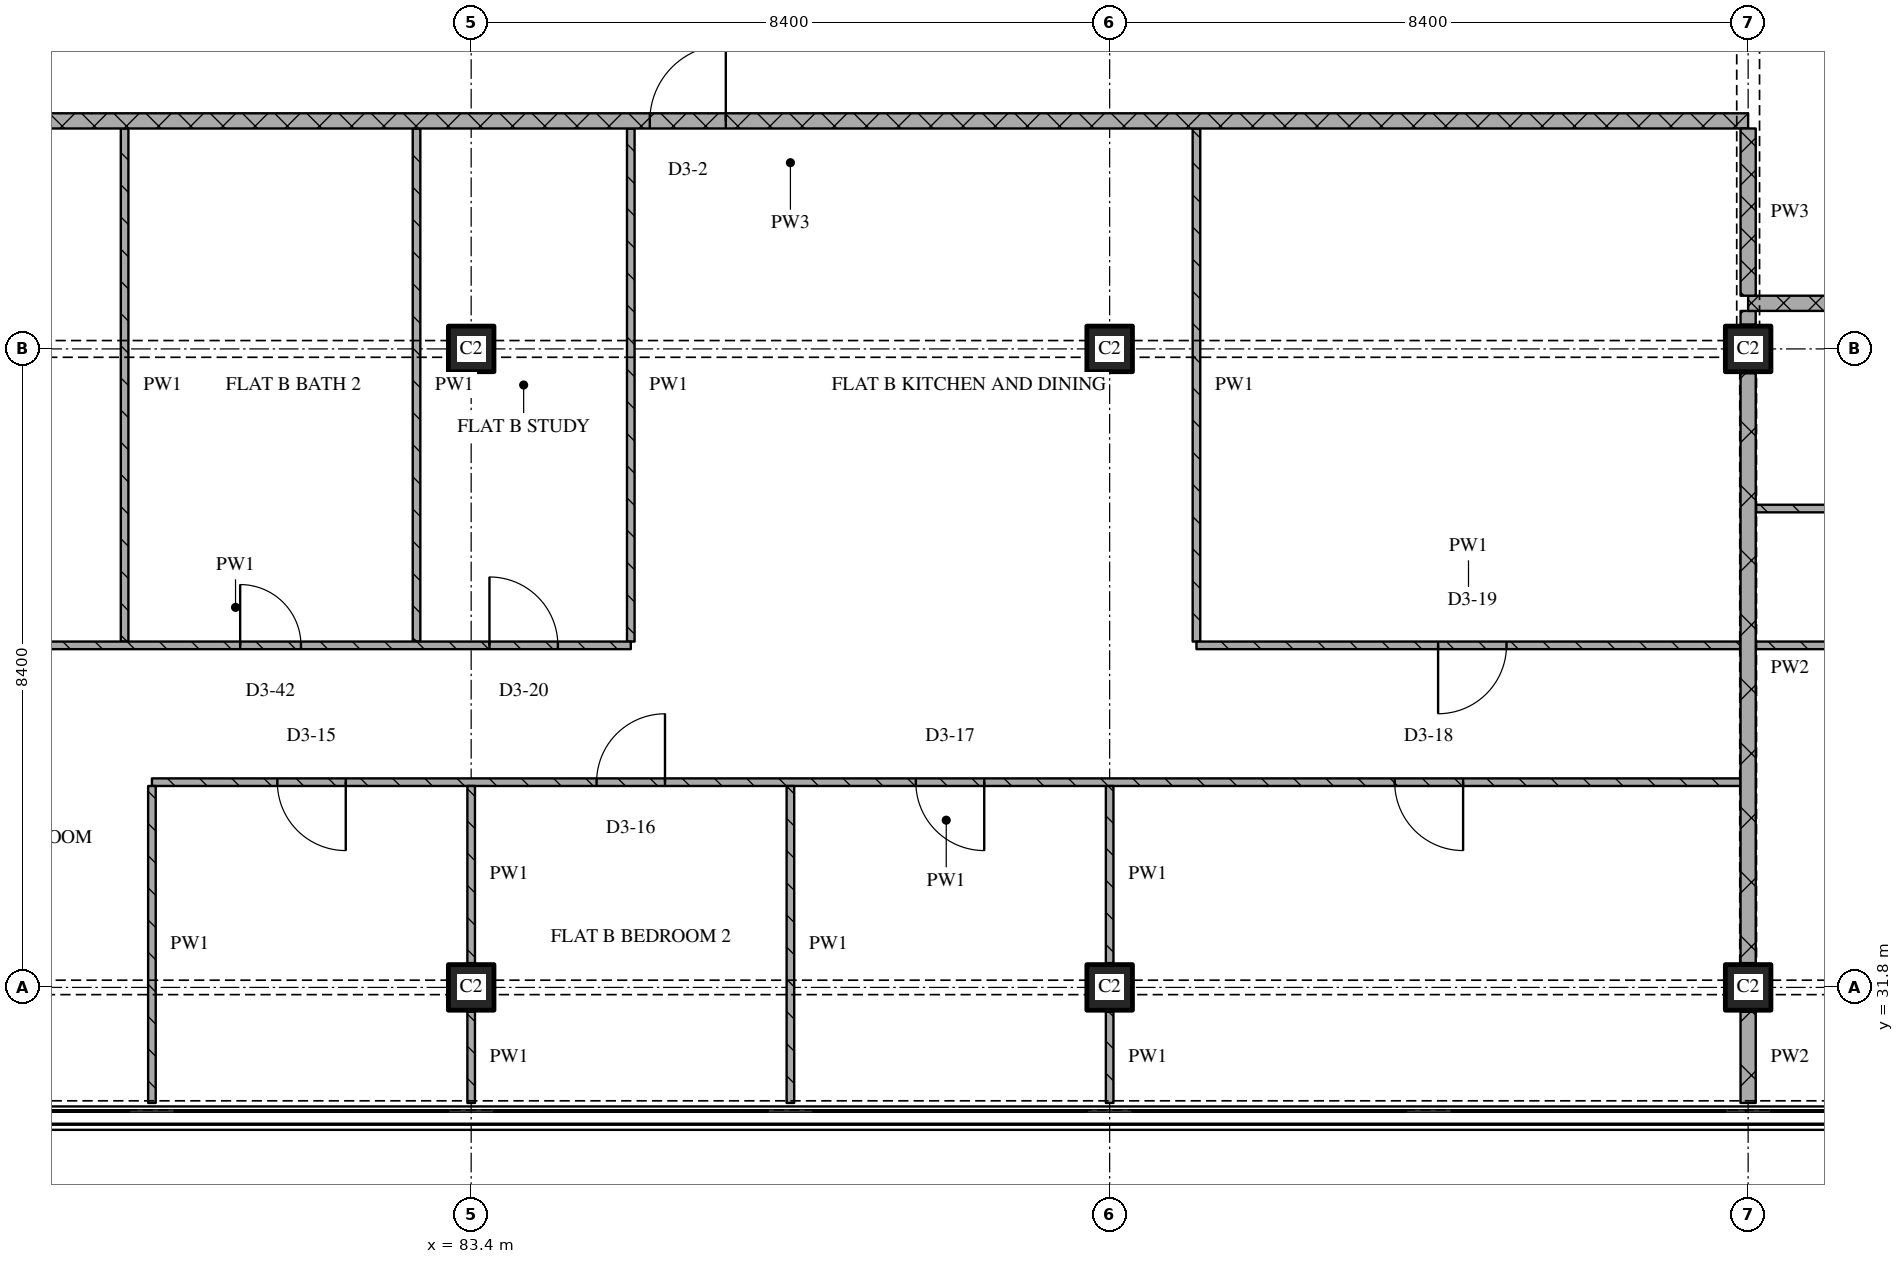
"""IFC4 building model, lengths in metres.
Left out: names, types, materials, properties, quantities, classifications, styles, units other than length and angle.
Written with IfcOpenShell. Run it as: python <this file> out.ifc"""

import sys

from ifc_helpers import new_model, si_unit, direction, frame, frame_2d, origin, origin_2d, place, context, subcontext, project, spatial, rectangle, extrude, element, fill, save


model = new_model("IFC4")
c1 = context("Model", 3, precision=1e-05, world=origin(), true_north=direction((0.0, 1.0)))
c2 = subcontext(c1, "Body", "Model", "MODEL_VIEW")
j1 = project(units=[si_unit("LENGTHUNIT", "METRE"), si_unit("PLANEANGLEUNIT", "RADIAN")], contexts=[c1])
p1 = place(None, origin())
s1 = spatial("IfcSite", under=j1, at=p1, CompositionType="ELEMENT")
p2 = place(p1, origin())
s2 = spatial("IfcBuilding", under=s1, at=p2, CompositionType="ELEMENT")
p3 = place(p2, frame((0.0, 0.0, 227.1)))
s3 = spatial("IfcBuildingStorey", under=s2, at=p3, CompositionType="ELEMENT", Elevation=227.1)
for number, where, z_axis, x_axis in (
    (1, (83.4, 31.8, 0.0), (0.0, 0.0, 1.0), (1.0, 0.0, 0.0)),
    (2, (83.4, 40.2, 0.0), (0.0, 0.0, 1.0), (1.0, 0.0, 0.0)),
    (3, (91.8, 31.8, 0.0), (0.0, 0.0, 1.0), (1.0, 0.0, 0.0)),
    (4, (91.8, 40.2, 0.0), (0.0, 0.0, 1.0), (1.0, 0.0, 0.0)),
    (5, (100.2, 31.8, 0.0), (0.0, 0.0, 1.0), (1.0, 0.0, 0.0)),
    (6, (100.2, 40.2, 0.0), (0.0, 0.0, 1.0), (1.0, 0.0, 0.0)),
):
    element("IfcColumn", number, at=place(p3, frame(where, z_axis=z_axis, x_axis=x_axis)), inside=s3, PredefinedType="COLUMN", context=c2, shape_type="SweptSolid", body=[
        extrude(rectangle(XDim=0.6, YDim=0.6, at=origin_2d()), origin(), (0.0, 0.0, 1.0), 3.6),
    ])
p4 = place(p3, frame((100.1, 34.5, 0.0), z_axis=(0.0, 0.0, 1.0), x_axis=(-1.0, 0.0, 0.0)))
e7 = element("IfcWall", 7, at=p4, inside=s3, PredefinedType="PARTITIONING", context=c2, shape_type="SweptSolid", body=[
    extrude(rectangle(XDim=20.9, YDim=0.1, at=frame_2d((10.45, 0.0))), origin(), (0.0, 0.0, 1.0), 3.32),
])
p5 = place(p4, frame((3.65, 0.0, 0.0)))
e8 = element("IfcOpeningElement", 8, at=p5, cuts=e7, PredefinedType="OPENING", context=c2, shape_type="SweptSolid", body=[
    extrude(rectangle(XDim=0.9, YDim=2.1, at=frame_2d((0.45, 1.05))), frame((0.0, 0.06, 0.0), z_axis=(0.0, -1.0, 0.0), x_axis=(1.0, 0.0, 0.0)), (0.0, 0.0, 1.0), 0.12),
])
p6 = place(p4, frame((9.95, 0.0, 0.0)))
e9 = element("IfcOpeningElement", 9, at=p6, cuts=e7, PredefinedType="OPENING", context=c2, shape_type="SweptSolid", body=[
    extrude(rectangle(XDim=0.9, YDim=2.1, at=frame_2d((0.45, 1.05))), frame((0.0, 0.06, 0.0), z_axis=(0.0, -1.0, 0.0), x_axis=(1.0, 0.0, 0.0)), (0.0, 0.0, 1.0), 0.12),
])
p7 = place(p4, frame((14.15, 0.0, 0.0)))
e10 = element("IfcOpeningElement", 10, at=p7, cuts=e7, PredefinedType="OPENING", context=c2, shape_type="SweptSolid", body=[
    extrude(rectangle(XDim=0.9, YDim=2.1, at=frame_2d((0.45, 1.05))), frame((0.0, 0.06, 0.0), z_axis=(0.0, -1.0, 0.0), x_axis=(1.0, 0.0, 0.0)), (0.0, 0.0, 1.0), 0.12),
])
p8 = place(p4, frame((18.35, 0.0, 0.0)))
e11 = element("IfcOpeningElement", 11, at=p8, cuts=e7, PredefinedType="OPENING", context=c2, shape_type="SweptSolid", body=[
    extrude(rectangle(XDim=0.9, YDim=2.1, at=frame_2d((0.45, 1.05))), frame((0.0, 0.06, 0.0), z_axis=(0.0, -1.0, 0.0), x_axis=(1.0, 0.0, 0.0)), (0.0, 0.0, 1.0), 0.12),
])
p9 = place(p3, frame((100.3, 38.1, 0.0), z_axis=(0.0, 0.0, 1.0), x_axis=(1.0, 0.0, 0.0)))
e12 = element("IfcWall", 12, at=p9, inside=s3, PredefinedType="PARTITIONING", context=c2, shape_type="SweptSolid", body=[
    extrude(rectangle(XDim=9.5, YDim=0.1, at=frame_2d((4.75, 0.0))), origin(), (0.0, 0.0, 1.0), 3.32),
])
p10 = place(p9, frame((1.75, 0.0, 0.0)))
e13 = element("IfcOpeningElement", 13, at=p10, cuts=e12, PredefinedType="OPENING", context=c2, shape_type="SweptSolid", body=[
    extrude(rectangle(XDim=0.8, YDim=2.1, at=frame_2d((0.4, 1.05))), frame((0.0, 0.06, 0.0), z_axis=(0.0, -1.0, 0.0), x_axis=(1.0, 0.0, 0.0)), (0.0, 0.0, 1.0), 0.12),
])
p11 = place(p3, frame((124.58, 40.8, 0.0), z_axis=(0.0, 0.0, 1.0), x_axis=(-1.0, 0.0, 0.0)))
e14 = element("IfcWall", 14, at=p11, inside=s3, PredefinedType="PARTITIONING", context=c2, shape_type="SweptSolid", body=[
    extrude(rectangle(XDim=24.38, YDim=0.2, at=frame_2d((12.19, 0.0))), origin(), (0.0, 0.0, 1.0), 3.32),
])
p12 = place(p11, frame((13.53, 0.0, 0.0)))
e15 = element("IfcOpeningElement", 15, at=p12, cuts=e14, PredefinedType="OPENING", context=c2, shape_type="SweptSolid", body=[
    extrude(rectangle(XDim=1.0, YDim=2.1, at=frame_2d((0.5, 1.05))), frame((0.0, 0.11, 0.0), z_axis=(0.0, -1.0, 0.0), x_axis=(1.0, 0.0, 0.0)), (0.0, 0.0, 1.0), 0.22),
])
p13 = place(p3, frame((100.2, 43.2, 0.0), z_axis=(0.0, 0.0, 1.0), x_axis=(-1.0, 0.0, 0.0)))
e16 = element("IfcWall", 16, at=p13, inside=s3, PredefinedType="PARTITIONING", context=c2, shape_type="SweptSolid", body=[
    extrude(rectangle(XDim=25.2, YDim=0.2, at=frame_2d((12.6, 0.0))), origin(), (0.0, 0.0, 1.0), 3.32),
])
p14 = place(p13, frame((13.45, 0.0, 0.0)))
e17 = element("IfcOpeningElement", 17, at=p14, cuts=e16, PredefinedType="OPENING", context=c2, shape_type="SweptSolid", body=[
    extrude(rectangle(XDim=1.0, YDim=2.1, at=frame_2d((0.5, 1.05))), frame((0.0, 0.11, 0.0), z_axis=(0.0, -1.0, 0.0), x_axis=(1.0, 0.0, 0.0)), (0.0, 0.0, 1.0), 0.22),
])
p15 = place(p3, frame((78.841, 43.1, 0.0), z_axis=(0.0, 0.0, 1.0), x_axis=(0.0, -1.0, 0.0)))
e18 = element("IfcWall", 18, at=p15, inside=s3, PredefinedType="PARTITIONING", context=c2, shape_type="SweptSolid", body=[
    extrude(rectangle(XDim=6.75, YDim=0.1, at=frame_2d((3.375, 0.0))), origin(), (0.0, 0.0, 1.0), 3.32),
])
p16 = place(p3, frame((79.2, 34.45, 0.0), z_axis=(0.0, 0.0, 1.0), x_axis=(0.0, -1.0, 0.0)))
e19 = element("IfcWall", 19, at=p16, inside=s3, PredefinedType="PARTITIONING", context=c2, shape_type="SweptSolid", body=[
    extrude(rectangle(XDim=4.17, YDim=0.1, at=frame_2d((2.085, 0.0))), origin(), (0.0, 0.0, 1.0), 3.32),
])
p17 = place(p3, frame((82.681, 43.1, 0.0), z_axis=(0.0, 0.0, 1.0), x_axis=(0.0, -1.0, 0.0)))
e20 = element("IfcWall", 20, at=p17, inside=s3, PredefinedType="PARTITIONING", context=c2, shape_type="SweptSolid", body=[
    extrude(rectangle(XDim=6.75, YDim=0.1, at=frame_2d((3.375, 0.0))), origin(), (0.0, 0.0, 1.0), 3.32),
])
p18 = place(p3, frame((83.4, 31.48, 0.0), z_axis=(0.0, 0.0, 1.0), x_axis=(0.0, -1.0, 0.0)))
e21 = element("IfcWall", 21, at=p18, inside=s3, PredefinedType="PARTITIONING", context=c2, shape_type="SweptSolid", body=[
    extrude(rectangle(XDim=1.2, YDim=0.1, at=frame_2d((0.6, 0.0))), origin(), (0.0, 0.0, 1.0), 3.32),
])
p19 = place(p3, frame((83.4, 34.45, 0.0), z_axis=(0.0, 0.0, 1.0), x_axis=(0.0, -1.0, 0.0)))
e22 = element("IfcWall", 22, at=p19, inside=s3, PredefinedType="PARTITIONING", context=c2, shape_type="SweptSolid", body=[
    extrude(rectangle(XDim=2.33, YDim=0.1, at=frame_2d((1.165, 0.0))), origin(), (0.0, 0.0, 1.0), 3.32),
])
p20 = place(p3, frame((85.5, 43.1, 0.0), z_axis=(0.0, 0.0, 1.0), x_axis=(0.0, -1.0, 0.0)))
e23 = element("IfcWall", 23, at=p20, inside=s3, PredefinedType="PARTITIONING", context=c2, shape_type="SweptSolid", body=[
    extrude(rectangle(XDim=6.75, YDim=0.1, at=frame_2d((3.375, 0.0))), origin(), (0.0, 0.0, 1.0), 3.32),
])
p21 = place(p3, frame((87.6, 34.45, 0.0), z_axis=(0.0, 0.0, 1.0), x_axis=(0.0, -1.0, 0.0)))
e24 = element("IfcWall", 24, at=p21, inside=s3, PredefinedType="PARTITIONING", context=c2, shape_type="SweptSolid", body=[
    extrude(rectangle(XDim=4.17, YDim=0.1, at=frame_2d((2.085, 0.0))), origin(), (0.0, 0.0, 1.0), 3.32),
])
p22 = place(p3, frame((91.8, 31.48, 0.0), z_axis=(0.0, 0.0, 1.0), x_axis=(0.0, -1.0, 0.0)))
e25 = element("IfcWall", 25, at=p22, inside=s3, PredefinedType="PARTITIONING", context=c2, shape_type="SweptSolid", body=[
    extrude(rectangle(XDim=1.2, YDim=0.1, at=frame_2d((0.6, 0.0))), origin(), (0.0, 0.0, 1.0), 3.32),
])
p23 = place(p3, frame((91.8, 34.45, 0.0), z_axis=(0.0, 0.0, 1.0), x_axis=(0.0, -1.0, 0.0)))
e26 = element("IfcWall", 26, at=p23, inside=s3, PredefinedType="PARTITIONING", context=c2, shape_type="SweptSolid", body=[
    extrude(rectangle(XDim=2.33, YDim=0.1, at=frame_2d((1.165, 0.0))), origin(), (0.0, 0.0, 1.0), 3.32),
])
p24 = place(p3, frame((92.942, 43.1, 0.0), z_axis=(0.0, 0.0, 1.0), x_axis=(0.0, -1.0, 0.0)))
e27 = element("IfcWall", 27, at=p24, inside=s3, PredefinedType="PARTITIONING", context=c2, shape_type="SweptSolid", body=[
    extrude(rectangle(XDim=6.75, YDim=0.1, at=frame_2d((3.375, 0.0))), origin(), (0.0, 0.0, 1.0), 3.32),
])
p25 = place(p3, frame((100.2, 43.1, 0.0), z_axis=(0.0, 0.0, 1.0), x_axis=(0.0, -1.0, 0.0)))
e28 = element("IfcWall", 28, at=p25, inside=s3, PredefinedType="PARTITIONING", context=c2, shape_type="SweptSolid", body=[
    extrude(rectangle(XDim=2.2, YDim=0.2, at=frame_2d((1.1, 0.0))), origin(), (0.0, 0.0, 1.0), 2.53),
])
p26 = place(p3, frame((100.2, 31.48, 0.0), z_axis=(0.0, 0.0, 1.0), x_axis=(0.0, -1.0, 0.0)))
e29 = element("IfcWall", 29, at=p26, inside=s3, PredefinedType="PARTITIONING", context=c2, shape_type="SweptSolid", body=[
    extrude(rectangle(XDim=1.2, YDim=0.2, at=frame_2d((0.6, 0.0))), origin(), (0.0, 0.0, 1.0), 3.32),
])
p27 = place(p3, frame((100.2, 39.88, 0.0), z_axis=(0.0, 0.0, 1.0), x_axis=(0.0, -1.0, 0.0)))
e30 = element("IfcWall", 30, at=p27, inside=s3, PredefinedType="PARTITIONING", context=c2, shape_type="SweptSolid", body=[
    extrude(rectangle(XDim=7.76, YDim=0.2, at=frame_2d((3.88, 0.0))), origin(), (0.0, 0.0, 1.0), 2.72),
])
p28 = place(p3, frame((100.2, 40.7, 0.0), z_axis=(0.0, 0.0, 1.0), x_axis=(0.0, -1.0, 0.0)))
e31 = element("IfcWall", 31, at=p28, inside=s3, PredefinedType="PARTITIONING", context=c2, shape_type="SweptSolid", body=[
    extrude(rectangle(XDim=0.18, YDim=0.2, at=frame_2d((0.09, 0.0))), origin(), (0.0, 0.0, 1.0), 3.32),
])
p29 = place(p3, frame((75.1, 36.3, 0.0), z_axis=(0.0, 0.0, 1.0), x_axis=(1.0, 0.0, 0.0)))
e32 = element("IfcWall", 32, at=p29, inside=s3, PredefinedType="PARTITIONING", context=c2, shape_type="SweptSolid", body=[
    extrude(rectangle(XDim=10.4, YDim=0.1, at=frame_2d((5.2, 0.0))), origin(), (0.0, 0.0, 1.0), 3.32),
])
p30 = place(p29, frame((1.42, 0.0, 0.0)))
e33 = element("IfcOpeningElement", 33, at=p30, cuts=e32, PredefinedType="OPENING", context=c2, shape_type="SweptSolid", body=[
    extrude(rectangle(XDim=0.8, YDim=2.1, at=frame_2d((0.4, 1.05))), frame((0.0, 0.06, 0.0), z_axis=(0.0, -1.0, 0.0), x_axis=(1.0, 0.0, 0.0)), (0.0, 0.0, 1.0), 0.12),
])
p31 = place(p29, frame((5.261, 0.0, 0.0)))
e34 = element("IfcOpeningElement", 34, at=p31, cuts=e32, PredefinedType="OPENING", context=c2, shape_type="SweptSolid", body=[
    extrude(rectangle(XDim=0.8, YDim=2.1, at=frame_2d((0.4, 1.05))), frame((0.0, 0.06, 0.0), z_axis=(0.0, -1.0, 0.0), x_axis=(1.0, 0.0, 0.0)), (0.0, 0.0, 1.0), 0.12),
])
p32 = place(p29, frame((8.541, 0.0, 0.0)))
e35 = element("IfcOpeningElement", 35, at=p32, cuts=e32, PredefinedType="OPENING", context=c2, shape_type="SweptSolid", body=[
    extrude(rectangle(XDim=0.9, YDim=2.1, at=frame_2d((0.45, 1.05))), frame((0.0, 0.06, 0.0), z_axis=(0.0, -1.0, 0.0), x_axis=(1.0, 0.0, 0.0)), (0.0, 0.0, 1.0), 0.12),
])
p33 = place(p3, frame((92.942, 36.3, 0.0), z_axis=(0.0, 0.0, 1.0), x_axis=(1.0, 0.0, 0.0)))
e36 = element("IfcWall", 36, at=p33, inside=s3, PredefinedType="PARTITIONING", context=c2, shape_type="SweptSolid", body=[
    extrude(rectangle(XDim=7.158, YDim=0.1, at=frame_2d((3.579, 0.0))), origin(), (0.0, 0.0, 1.0), 3.32),
])
p34 = place(p33, frame((3.179, 0.0, 0.0)))
e37 = element("IfcOpeningElement", 37, at=p34, cuts=e36, PredefinedType="OPENING", context=c2, shape_type="SweptSolid", body=[
    extrude(rectangle(XDim=0.9, YDim=2.1, at=frame_2d((0.45, 1.05))), frame((0.0, 0.06, 0.0), z_axis=(0.0, -1.0, 0.0), x_axis=(1.0, 0.0, 0.0)), (0.0, 0.0, 1.0), 0.12),
])
p35 = place(p3, frame((100.3, 36.3, 0.0), z_axis=(0.0, 0.0, 1.0), x_axis=(1.0, 0.0, 0.0)))
e38 = element("IfcWall", 38, at=p35, inside=s3, PredefinedType="PARTITIONING", context=c2, shape_type="SweptSolid", body=[
    extrude(rectangle(XDim=8.3, YDim=0.1, at=frame_2d((4.15, 0.0))), origin(), (0.0, 0.0, 1.0), 3.32),
])
p36 = place(p5, origin())
e39 = element("IfcDoor", 39, at=p36, inside=s3, OperationType="SINGLE_SWING_LEFT", PredefinedType="DOOR", context=c2, shape_type="SweptSolid", body=[
    extrude(rectangle(XDim=0.9, YDim=2.1, at=frame_2d((0.45, 1.05))), frame((0.0, 0.025, 0.0), z_axis=(0.0, -1.0, 0.0), x_axis=(1.0, 0.0, 0.0)), (0.0, 0.0, 1.0), 0.05),
])
fill(e8, e39)
p37 = place(p6, origin())
e40 = element("IfcDoor", 40, at=p37, inside=s3, OperationType="SINGLE_SWING_LEFT", PredefinedType="DOOR", context=c2, shape_type="SweptSolid", body=[
    extrude(rectangle(XDim=0.9, YDim=2.1, at=frame_2d((0.45, 1.05))), frame((0.0, 0.025, 0.0), z_axis=(0.0, -1.0, 0.0), x_axis=(1.0, 0.0, 0.0)), (0.0, 0.0, 1.0), 0.05),
])
fill(e9, e40)
p38 = place(p7, origin())
e41 = element("IfcDoor", 41, at=p38, inside=s3, OperationType="SINGLE_SWING_RIGHT", PredefinedType="DOOR", context=c2, shape_type="SweptSolid", body=[
    extrude(rectangle(XDim=0.9, YDim=2.1, at=frame_2d((0.45, 1.05))), frame((0.0, 0.025, 0.0), z_axis=(0.0, -1.0, 0.0), x_axis=(1.0, 0.0, 0.0)), (0.0, 0.0, 1.0), 0.05),
])
fill(e10, e41)
p39 = place(p8, origin())
e42 = element("IfcDoor", 42, at=p39, inside=s3, OperationType="SINGLE_SWING_LEFT", PredefinedType="DOOR", context=c2, shape_type="SweptSolid", body=[
    extrude(rectangle(XDim=0.9, YDim=2.1, at=frame_2d((0.45, 1.05))), frame((0.0, 0.025, 0.0), z_axis=(0.0, -1.0, 0.0), x_axis=(1.0, 0.0, 0.0)), (0.0, 0.0, 1.0), 0.05),
])
fill(e11, e42)
p40 = place(p14, origin())
e43 = element("IfcDoor", 43, at=p40, inside=s3, OperationType="SINGLE_SWING_RIGHT", PredefinedType="DOOR", context=c2, shape_type="SweptSolid", body=[
    extrude(rectangle(XDim=1.0, YDim=2.1, at=frame_2d((0.5, 1.05))), frame((0.0, 0.025, 0.0), z_axis=(0.0, -1.0, 0.0), x_axis=(1.0, 0.0, 0.0)), (0.0, 0.0, 1.0), 0.05),
])
fill(e17, e43)
p41 = place(p31, origin())
e44 = element("IfcDoor", 44, at=p41, inside=s3, OperationType="SINGLE_SWING_LEFT", PredefinedType="DOOR", context=c2, shape_type="SweptSolid", body=[
    extrude(rectangle(XDim=0.8, YDim=2.1, at=frame_2d((0.4, 1.05))), frame((0.0, 0.025, 0.0), z_axis=(0.0, -1.0, 0.0), x_axis=(1.0, 0.0, 0.0)), (0.0, 0.0, 1.0), 0.05),
])
fill(e34, e44)
p42 = place(p32, origin())
e45 = element("IfcDoor", 45, at=p42, inside=s3, OperationType="SINGLE_SWING_LEFT", PredefinedType="DOOR", context=c2, shape_type="SweptSolid", body=[
    extrude(rectangle(XDim=0.9, YDim=2.1, at=frame_2d((0.45, 1.05))), frame((0.0, 0.025, 0.0), z_axis=(0.0, -1.0, 0.0), x_axis=(1.0, 0.0, 0.0)), (0.0, 0.0, 1.0), 0.05),
])
fill(e35, e45)
p43 = place(p34, origin())
e46 = element("IfcDoor", 46, at=p43, inside=s3, OperationType="SINGLE_SWING_RIGHT", PredefinedType="DOOR", context=c2, shape_type="SweptSolid", body=[
    extrude(rectangle(XDim=0.9, YDim=2.1, at=frame_2d((0.45, 1.05))), frame((0.0, 0.025, 0.0), z_axis=(0.0, -1.0, 0.0), x_axis=(1.0, 0.0, 0.0)), (0.0, 0.0, 1.0), 0.05),
])
fill(e37, e46)
save(model, sys.argv[1])
